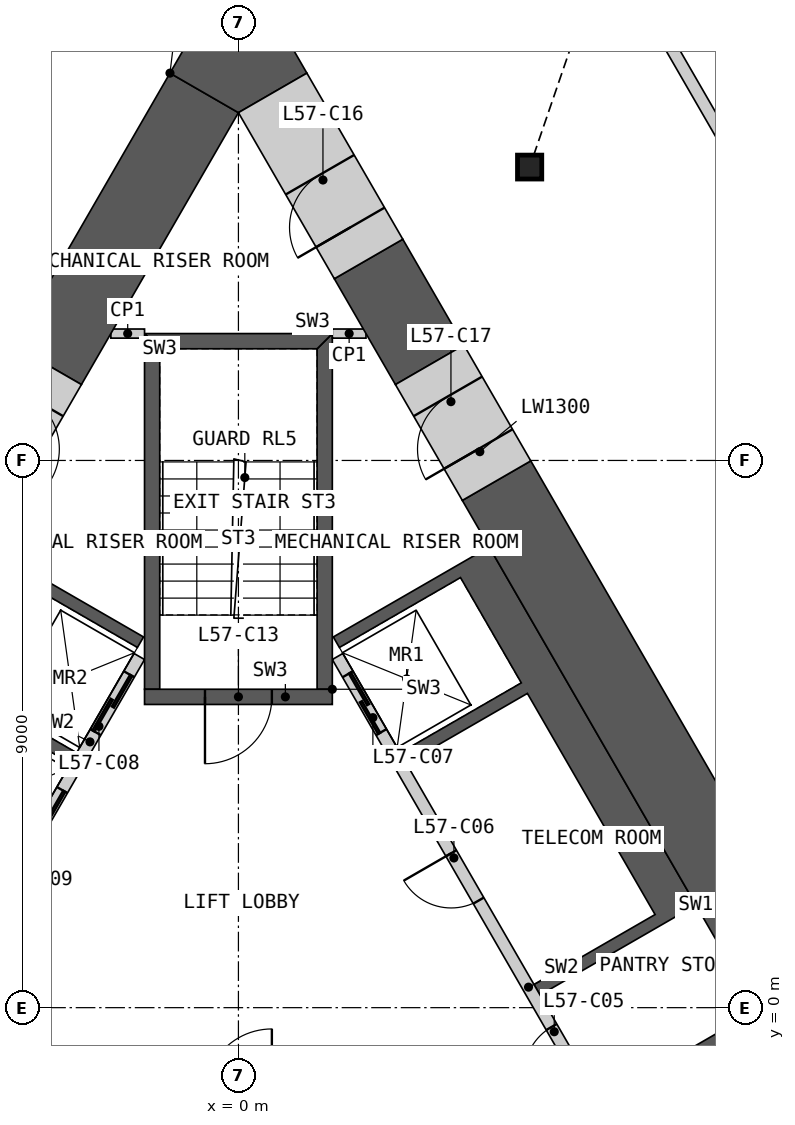
"""IFC4 building model, lengths in metres.
Left out: names, types, materials, properties, quantities, classifications, styles, units other than length and angle.
Written with IfcOpenShell. Run it as: python <this file> out.ifc"""

import sys

from ifc_helpers import new_model, si_unit, direction, frame, frame_2d, origin, origin_2d, place, context, subcontext, project, spatial, polyline, rectangle, i_section, outline, extrude, element, fill, save


model = new_model("IFC4")
c1 = context("Model", 3, precision=1e-05, world=origin(), true_north=direction((0.0, 1.0)))
c2 = subcontext(c1, "Body", "Model", "MODEL_VIEW")
j1 = project(units=[si_unit("LENGTHUNIT", "METRE"), si_unit("PLANEANGLEUNIT", "RADIAN")], contexts=[c1])
p1 = place(None, origin())
s1 = spatial("IfcSite", under=j1, at=p1, CompositionType="ELEMENT")
p2 = place(p1, origin())
s2 = spatial("IfcBuilding", under=s1, at=p2, CompositionType="ELEMENT")
p3 = place(p2, frame((0.0, 0.0, 256.2)))
s3 = spatial("IfcBuildingStorey", under=s2, at=p3, CompositionType="ELEMENT", Elevation=256.2)
p4 = place(p3, frame((4.789, 13.825, 0.0), z_axis=(0.0, 0.0, 1.0), x_axis=(1.0, 0.0, 0.0)))
e1 = element("IfcColumn", 1, at=p4, inside=s3, PredefinedType="COLUMN", context=c2, shape_type="SweptSolid", body=[
    extrude(i_section(OverallWidth=0.399, OverallDepth=0.393, WebThickness=0.023, FlangeThickness=0.037, at=origin_2d()), origin(), (0.0, 0.0, 1.0), 3.6),
])
p5 = place(p3, origin())
e2 = element("IfcWall", 2, at=p5, inside=s3, PredefinedType="SHEAR", context=c2, shape_type="SweptSolid", body=[
    extrude(outline(polyline([(8.524, -0.044), (8.624, -0.217), (8.231, -0.444), (6.061, -1.697), (5.96, -1.524), (8.131, -0.271), (8.524, -0.044)])), origin(), (0.0, 0.0, 1.0), 3.25),
])
p6 = place(p3, origin())
e3 = element("IfcWall", 3, at=p6, inside=s3, PredefinedType="SHEAR", context=c2, shape_type="SweptSolid", body=[
    extrude(outline(polyline([(7.524, 1.688), (7.131, 1.461), (4.96, 0.208), (4.861, 0.381), (6.852, 1.531), (4.752, 5.169), (2.76, 4.019), (2.66, 4.192), (4.652, 5.342), (3.652, 7.074), (1.66, 5.924), (1.561, 6.097), (3.731, 7.35), (4.124, 7.577), (7.524, 1.688)])), origin(), (0.0, 0.0, 1.0), 3.25),
])
p7 = place(p3, frame((5.817, -1.476, 0.0), z_axis=(0.0, 0.0, 1.0), x_axis=(-0.500002616675, 0.866023893041, 0.0)))
e4 = element("IfcWall", 4, at=p7, inside=s3, PredefinedType="SOLIDWALL", context=c2, shape_type="SweptSolid", body=[
    extrude(rectangle(XDim=8.373, YDim=0.2, at=frame_2d((4.187, 0.0))), origin(), (0.0, 0.0, 1.0), 3.25),
])
p8 = place(p7, frame((0.437, 0.0, 0.0)))
e5 = element("IfcOpeningElement", 5, at=p8, cuts=e4, PredefinedType="OPENING", context=c2, shape_type="SweptSolid", body=[
    extrude(rectangle(XDim=0.9, YDim=2.1, at=frame_2d((0.45, 1.05))), frame((0.0, 0.11, 0.0), z_axis=(0.0, -1.0, 0.0), x_axis=(1.0, 0.0, 0.0)), (0.0, 0.0, 1.0), 0.22),
])
p9 = place(p7, frame((3.737, 0.0, 0.0)))
e6 = element("IfcOpeningElement", 6, at=p9, cuts=e4, PredefinedType="OPENING", context=c2, shape_type="SweptSolid", body=[
    extrude(rectangle(XDim=0.9, YDim=2.1, at=frame_2d((0.45, 1.05))), frame((0.0, 0.11, 0.0), z_axis=(0.0, -1.0, 0.0), x_axis=(1.0, 0.0, 0.0)), (0.0, 0.0, 1.0), 0.22),
])
p10 = place(p7, frame((6.937, 0.0, 0.0)))
e7 = element("IfcOpeningElement", 7, at=p10, cuts=e4, PredefinedType="OPENING", context=c2, shape_type="SweptSolid", body=[
    extrude(rectangle(XDim=1.1, YDim=2.1, at=frame_2d((0.55, 1.05))), frame((0.0, 0.11, 0.0), z_axis=(0.0, -1.0, 0.0), x_axis=(1.0, 0.0, 0.0)), (0.0, 0.0, 1.0), 0.22),
])
p11 = place(p3, origin())
e8 = element("IfcWall", 8, at=p11, inside=s3, PredefinedType="SHEAR", context=c2, shape_type="SweptSolid", body=[
    extrude(outline(polyline([(-7.524, 1.688), (-4.124, 7.577), (-3.731, 7.35), (-1.561, 6.097), (-1.66, 5.924), (-3.652, 7.074), (-4.652, 5.342), (-2.66, 4.192), (-2.76, 4.019), (-4.752, 5.169), (-5.752, 3.437), (-3.76, 2.287), (-3.861, 2.113), (-5.852, 3.263), (-6.852, 1.531), (-4.861, 0.381), (-4.96, 0.208), (-7.131, 1.461), (-7.524, 1.688)])), origin(), (0.0, 0.0, 1.0), 3.25),
])
p12 = place(p3, frame((-1.631, 5.776, 0.0), z_axis=(0.0, 0.0, 1.0), x_axis=(-0.499992876559, -0.866029516466, 0.0)))
e9 = element("IfcWall", 9, at=p12, inside=s3, PredefinedType="SOLIDWALL", context=c2, shape_type="SweptSolid", body=[
    extrude(rectangle(XDim=6.486, YDim=0.2, at=frame_2d((3.243, 0.0))), origin(), (0.0, 0.0, 1.0), 3.25),
])
p13 = place(p12, frame((0.337, 0.0, 0.0)))
e10 = element("IfcOpeningElement", 10, at=p13, cuts=e9, PredefinedType="OPENING", context=c2, shape_type="SweptSolid", body=[
    extrude(rectangle(XDim=1.1, YDim=2.1, at=frame_2d((0.55, 1.05))), frame((0.0, 0.11, 0.0), z_axis=(0.0, -1.0, 0.0), x_axis=(1.0, 0.0, 0.0)), (0.0, 0.0, 1.0), 0.22),
])
p14 = place(p12, frame((2.537, 0.0, 0.0)))
e11 = element("IfcOpeningElement", 11, at=p14, cuts=e9, PredefinedType="OPENING", context=c2, shape_type="SweptSolid", body=[
    extrude(rectangle(XDim=1.1, YDim=2.1, at=frame_2d((0.55, 1.05))), frame((0.0, 0.11, 0.0), z_axis=(0.0, -1.0, 0.0), x_axis=(1.0, 0.0, 0.0)), (0.0, 0.0, 1.0), 0.22),
])
p15 = place(p3, origin())
e12 = element("IfcWall", 12, at=p15, inside=s3, PredefinedType="SHEAR", context=c2, shape_type="SweptSolid", body=[
    extrude(outline(polyline([(1.544, 5.237), (1.544, 11.087), (1.294, 10.837), (1.294, 5.237), (1.544, 5.237)])), origin(), (0.0, 0.0, 1.0), 3.25),
])
p16 = place(p3, origin())
e13 = element("IfcWall", 13, at=p16, inside=s3, PredefinedType="SHEAR", context=c2, shape_type="SweptSolid", body=[
    extrude(outline(polyline([(1.544, 11.087), (-1.544, 11.087), (-1.294, 10.837), (1.294, 10.837), (1.544, 11.087)])), origin(), (0.0, 0.0, 1.0), 3.25),
])
p17 = place(p3, origin())
e14 = element("IfcWall", 14, at=p17, inside=s3, PredefinedType="SHEAR", context=c2, shape_type="SweptSolid", body=[
    extrude(outline(polyline([(-1.294, 10.837), (-1.544, 11.087), (-1.544, 5.237), (-1.294, 5.237), (-1.294, 10.837)])), origin(), (0.0, 0.0, 1.0), 3.25),
])
p18 = place(p3, frame((1.544, 5.112, 0.0), z_axis=(0.0, 0.0, 1.0), x_axis=(-1.0, 0.0, 0.0)))
e15 = element("IfcWall", 15, at=p18, inside=s3, PredefinedType="SHEAR", context=c2, shape_type="SweptSolid", body=[
    extrude(rectangle(XDim=3.088, YDim=0.25, at=frame_2d((1.544, 0.0))), origin(), (0.0, 0.0, 1.0), 3.25),
])
p19 = place(p18, frame((0.994, 0.0, 0.0)))
e16 = element("IfcOpeningElement", 16, at=p19, cuts=e15, PredefinedType="OPENING", context=c2, shape_type="SweptSolid", body=[
    extrude(rectangle(XDim=1.1, YDim=2.1, at=frame_2d((0.55, 1.05))), frame((0.0, 0.135, 0.0), z_axis=(0.0, -1.0, 0.0), x_axis=(1.0, 0.0, 0.0)), (0.0, 0.0, 1.0), 0.27),
])
for number, where, z_axis, x_axis in (
    (17, (1.544, 11.087, 0.0), (0.0, 0.0, 1.0), (1.0, 0.0, 0.0)),
    (18, (-1.544, 11.087, 0.0), (0.0, 0.0, 1.0), (-1.0, 0.0, 0.0)),
):
    element("IfcWall", number, at=place(p3, frame(where, z_axis=z_axis, x_axis=x_axis)), inside=s3, PredefinedType="PARTITIONING", context=c2, shape_type="SweptSolid", body=[
        extrude(rectangle(XDim=0.554, YDim=0.15, at=frame_2d((0.277, 0.0))), origin(), (0.0, 0.0, 1.0), 3.25),
    ])
p20 = place(p3, frame((10.081, -1.441, 0.0), z_axis=(0.0, 0.0, 1.0), x_axis=(-0.500006109471, 0.866021876451, 0.0)))
e19 = element("IfcWall", 19, at=p20, inside=s3, PredefinedType="SHEAR", context=c2, shape_type="SweptSolid", body=[
    extrude(rectangle(XDim=11.672, YDim=1.3, at=frame_2d((5.836, 0.0))), origin(), (0.0, 0.0, 1.0), 3.25),
])
p21 = place(p3, frame((3.145, 10.573, 0.0), z_axis=(0.0, 0.0, 1.0), x_axis=(-0.500006371327, 0.866021725266, 0.0)))
e20 = element("IfcWall", 20, at=p21, inside=s3, PredefinedType="SHEAR", context=c2, shape_type="SweptSolid", body=[
    extrude(rectangle(XDim=2.01, YDim=1.3, at=frame_2d((1.005, 0.0))), origin(), (0.0, 0.0, 1.0), 3.25),
])
p22 = place(p3, frame((-0.563, 15.045, 0.0), z_axis=(0.0, 0.0, 1.0), x_axis=(-0.499982995661, -0.866035221021, 0.0)))
e21 = element("IfcWall", 21, at=p22, inside=s3, PredefinedType="SHEAR", context=c2, shape_type="SweptSolid", body=[
    extrude(rectangle(XDim=5.164, YDim=1.3, at=frame_2d((2.582, 0.0))), origin(), (0.0, 0.0, 1.0), 3.25),
])
p23 = place(p3, origin())
e22 = element("IfcWall", 22, at=p23, inside=s3, PredefinedType="SHEAR", context=c2, shape_type="SweptSolid", body=[
    extrude(outline(polyline([(-1.126, 15.371), (0.0, 17.321), (1.126, 15.371), (0.0, 14.72), (-1.126, 15.371)])), origin(), (0.0, 0.0, 1.0), 3.25),
])
p24 = place(p3, frame((2.14, 12.313, 0.0), z_axis=(0.0, 0.0, 1.0), x_axis=(-0.499968102766, 0.866043818878, 0.0)))
e23 = element("IfcWall", 23, at=p24, inside=s3, PredefinedType="SHEAR", context=c2, shape_type="SweptSolid", body=[
    extrude(rectangle(XDim=3.155, YDim=1.3, at=frame_2d((1.577, 0.0))), origin(), (0.0, 0.0, 1.0), 3.25),
])
p25 = place(p24, frame((0.6, 0.0, 0.0)))
e24 = element("IfcOpeningElement", 24, at=p25, cuts=e23, PredefinedType="OPENING", context=c2, shape_type="SweptSolid", body=[
    extrude(rectangle(XDim=1.0, YDim=2.1, at=frame_2d((0.5, 1.05))), frame((0.0, 0.66, 0.0), z_axis=(0.0, -1.0, 0.0), x_axis=(1.0, 0.0, 0.0)), (0.0, 0.0, 1.0), 1.32),
])
p26 = place(p3, frame((4.245, 8.668, 0.0), z_axis=(0.0, 0.0, 1.0), x_axis=(-0.50002983664, 0.866008176907, 0.0)))
e25 = element("IfcWall", 25, at=p26, inside=s3, PredefinedType="SHEAR", context=c2, shape_type="SweptSolid", body=[
    extrude(rectangle(XDim=2.2, YDim=1.3, at=frame_2d((1.1, 0.0))), origin(), (0.0, 0.0, 1.0), 3.25),
])
p27 = place(p26, frame((0.6, 0.0, 0.0)))
e26 = element("IfcOpeningElement", 26, at=p27, cuts=e25, PredefinedType="OPENING", context=c2, shape_type="SweptSolid", body=[
    extrude(rectangle(XDim=1.0, YDim=2.1, at=frame_2d((0.5, 1.05))), frame((0.0, 0.66, 0.0), z_axis=(0.0, -1.0, 0.0), x_axis=(1.0, 0.0, 0.0)), (0.0, 0.0, 1.0), 1.32),
])
p28 = place(p3, frame((-3.145, 10.573, 0.0), z_axis=(0.0, 0.0, 1.0), x_axis=(-0.50002983664, -0.866008176907, 0.0)))
e27 = element("IfcWall", 27, at=p28, inside=s3, PredefinedType="SHEAR", context=c2, shape_type="SweptSolid", body=[
    extrude(rectangle(XDim=2.2, YDim=1.3, at=frame_2d((1.1, 0.0))), origin(), (0.0, 0.0, 1.0), 3.25),
])
p29 = place(p28, frame((0.6, 0.0, 0.0)))
e28 = element("IfcOpeningElement", 28, at=p29, cuts=e27, PredefinedType="OPENING", context=c2, shape_type="SweptSolid", body=[
    extrude(rectangle(XDim=1.0, YDim=2.1, at=frame_2d((0.5, 1.05))), frame((0.0, 0.66, 0.0), z_axis=(0.0, -1.0, 0.0), x_axis=(1.0, 0.0, 0.0)), (0.0, 0.0, 1.0), 1.32),
])
p30 = place(p3, frame((5.377, 18.807, 0.0), z_axis=(0.0, 0.0, 1.0), x_axis=(0.499999852422, -0.866025488988, 0.0)))
e29 = element("IfcWall", 29, at=p30, inside=s3, PredefinedType="PARTITIONING", context=c2, shape_type="SweptSolid", body=[
    extrude(rectangle(XDim=27.198, YDim=0.2, at=frame_2d((13.599, 0.0))), origin(), (0.0, 0.0, 1.0), 3.25),
])
p31 = place(p30, frame((25.096, 0.0, 0.0)))
e30 = element("IfcOpeningElement", 30, at=p31, cuts=e29, PredefinedType="OPENING", context=c2, shape_type="SweptSolid", body=[
    extrude(rectangle(XDim=0.95, YDim=2.1, at=frame_2d((0.475, 1.05))), frame((0.0, 0.11, 0.0), z_axis=(0.0, -1.0, 0.0), x_axis=(1.0, 0.0, 0.0)), (0.0, 0.0, 1.0), 0.22),
])
p32 = place(p30, frame((19.122, 0.0, 0.0)))
e31 = element("IfcOpeningElement", 31, at=p32, cuts=e29, PredefinedType="OPENING", context=c2, shape_type="SweptSolid", body=[
    extrude(rectangle(XDim=1.0, YDim=2.1, at=frame_2d((0.5, 1.05))), frame((0.0, 0.11, 0.0), z_axis=(0.0, -1.0, 0.0), x_axis=(1.0, 0.0, 0.0)), (0.0, 0.0, 1.0), 0.22),
])
p33 = place(p30, frame((17.115, 0.0, 0.0)))
e32 = element("IfcOpeningElement", 32, at=p33, cuts=e29, PredefinedType="OPENING", context=c2, shape_type="SweptSolid", body=[
    extrude(rectangle(XDim=1.1, YDim=2.1, at=frame_2d((0.55, 1.05))), frame((0.0, 0.11, 0.0), z_axis=(0.0, -1.0, 0.0), x_axis=(1.0, 0.0, 0.0)), (0.0, 0.0, 1.0), 0.22),
])
p34 = place(p30, frame((0.35, 0.0, 0.0)))
e33 = element("IfcOpeningElement", 33, at=p34, cuts=e29, PredefinedType="OPENING", context=c2, shape_type="SweptSolid", body=[
    extrude(rectangle(XDim=1.1, YDim=2.1, at=frame_2d((0.55, 1.05))), frame((0.0, 0.11, 0.0), z_axis=(0.0, -1.0, 0.0), x_axis=(1.0, 0.0, 0.0)), (0.0, 0.0, 1.0), 0.22),
])
p35 = place(p3, frame((-4.668, 14.035, 0.0), z_axis=(0.0, 0.0, 1.0), x_axis=(0.499984524817, 0.866034338201, 0.0)))
e34 = element("IfcWall", 34, at=p35, inside=s3, PredefinedType="PARTITIONING", context=c2, shape_type="SweptSolid", body=[
    extrude(rectangle(XDim=5.51, YDim=0.2, at=frame_2d((2.755, 0.0))), origin(), (0.0, 0.0, 1.0), 3.25),
])
p36 = place(p35, frame((4.01, 0.0, 0.0)))
e35 = element("IfcOpeningElement", 35, at=p36, cuts=e34, PredefinedType="OPENING", context=c2, shape_type="SweptSolid", body=[
    extrude(rectangle(XDim=1.1, YDim=2.1, at=frame_2d((0.55, 1.05))), frame((0.0, 0.11, 0.0), z_axis=(0.0, -1.0, 0.0), x_axis=(1.0, 0.0, 0.0)), (0.0, 0.0, 1.0), 0.22),
])
p37 = place(p8, origin())
e36 = element("IfcDoor", 36, at=p37, inside=s3, OperationType="SINGLE_SWING_LEFT", PredefinedType="DOOR", context=c2, shape_type="SweptSolid", body=[
    extrude(rectangle(XDim=0.9, YDim=2.1, at=frame_2d((0.45, 1.05))), frame((0.0, 0.025, 0.0), z_axis=(0.0, -1.0, 0.0), x_axis=(1.0, 0.0, 0.0)), (0.0, 0.0, 1.0), 0.05),
])
fill(e5, e36)
p38 = place(p9, origin())
e37 = element("IfcDoor", 37, at=p38, inside=s3, OperationType="SINGLE_SWING_RIGHT", PredefinedType="DOOR", context=c2, shape_type="SweptSolid", body=[
    extrude(rectangle(XDim=0.9, YDim=2.1, at=frame_2d((0.45, 1.05))), frame((0.0, 0.025, 0.0), z_axis=(0.0, -1.0, 0.0), x_axis=(1.0, 0.0, 0.0)), (0.0, 0.0, 1.0), 0.05),
])
fill(e6, e37)
p39 = place(p10, origin())
e38 = element("IfcDoor", 38, at=p39, inside=s3, OperationType="SLIDING_TO_LEFT", PredefinedType="DOOR", context=c2, shape_type="SweptSolid", body=[
    extrude(rectangle(XDim=1.1, YDim=2.1, at=frame_2d((0.55, 1.05))), frame((0.0, 0.025, 0.0), z_axis=(0.0, -1.0, 0.0), x_axis=(1.0, 0.0, 0.0)), (0.0, 0.0, 1.0), 0.05),
])
fill(e7, e38)
p40 = place(p13, origin())
e39 = element("IfcDoor", 39, at=p40, inside=s3, OperationType="SLIDING_TO_LEFT", PredefinedType="DOOR", context=c2, shape_type="SweptSolid", body=[
    extrude(rectangle(XDim=1.1, YDim=2.1, at=frame_2d((0.55, 1.05))), frame((0.0, 0.025, 0.0), z_axis=(0.0, -1.0, 0.0), x_axis=(1.0, 0.0, 0.0)), (0.0, 0.0, 1.0), 0.05),
])
fill(e10, e39)
p41 = place(p14, origin())
e40 = element("IfcDoor", 40, at=p41, inside=s3, OperationType="SLIDING_TO_LEFT", PredefinedType="DOOR", context=c2, shape_type="SweptSolid", body=[
    extrude(rectangle(XDim=1.1, YDim=2.1, at=frame_2d((0.55, 1.05))), frame((0.0, 0.025, 0.0), z_axis=(0.0, -1.0, 0.0), x_axis=(1.0, 0.0, 0.0)), (0.0, 0.0, 1.0), 0.05),
])
fill(e11, e40)
p42 = place(p19, origin())
e41 = element("IfcDoor", 41, at=p42, inside=s3, OperationType="SINGLE_SWING_RIGHT", PredefinedType="DOOR", context=c2, shape_type="SweptSolid", body=[
    extrude(rectangle(XDim=1.1, YDim=2.1, at=frame_2d((0.55, 1.05))), frame((0.0, 0.025, 0.0), z_axis=(0.0, -1.0, 0.0), x_axis=(1.0, 0.0, 0.0)), (0.0, 0.0, 1.0), 0.05),
])
fill(e16, e41)
p43 = place(p25, origin())
e42 = element("IfcDoor", 42, at=p43, inside=s3, OperationType="SINGLE_SWING_LEFT", PredefinedType="DOOR", context=c2, shape_type="SweptSolid", body=[
    extrude(rectangle(XDim=1.0, YDim=2.1, at=frame_2d((0.5, 1.05))), frame((0.0, 0.405, 0.0), z_axis=(0.0, -1.0, 0.0), x_axis=(1.0, 0.0, 0.0)), (0.0, 0.0, 1.0), 0.05),
])
fill(e24, e42)
p44 = place(p27, origin())
e43 = element("IfcDoor", 43, at=p44, inside=s3, OperationType="SINGLE_SWING_LEFT", PredefinedType="DOOR", context=c2, shape_type="SweptSolid", body=[
    extrude(rectangle(XDim=1.0, YDim=2.1, at=frame_2d((0.5, 1.05))), frame((0.0, 0.405, 0.0), z_axis=(0.0, -1.0, 0.0), x_axis=(1.0, 0.0, 0.0)), (0.0, 0.0, 1.0), 0.05),
])
fill(e26, e43)
save(model, sys.argv[1])
